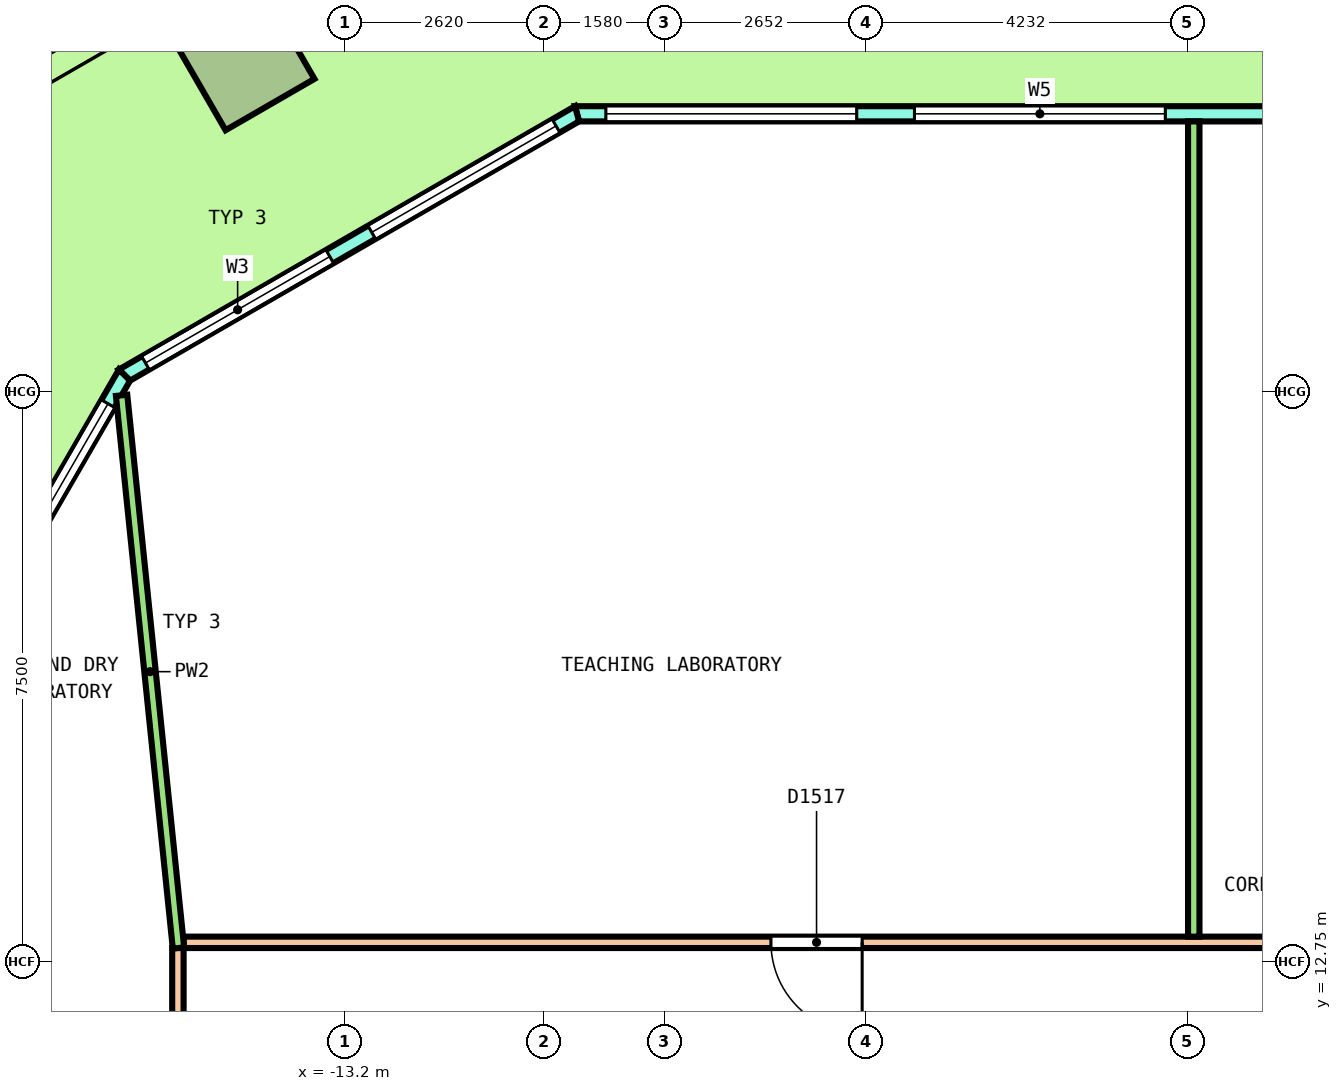
"""IFC4 building model, lengths in metres.
Left out: names, types, materials, properties, quantities, classifications, styles, units other than length and angle.
Written with IfcOpenShell. Run it as: python <this file> out.ifc"""

import sys

from ifc_helpers import new_model, si_unit, direction, frame, frame_2d, origin, origin_2d, place, context, subcontext, project, spatial, polyline, rectangle, outline, extrude, element, fill, save


model = new_model("IFC4")
c1 = context("Model", 3, precision=1e-05, world=origin(), true_north=direction((0.0, 1.0)))
c2 = subcontext(c1, "Body", "Model", "MODEL_VIEW")
j1 = project(units=[si_unit("LENGTHUNIT", "METRE"), si_unit("PLANEANGLEUNIT", "RADIAN")], contexts=[c1])
p1 = place(None, origin())
s1 = spatial("IfcSite", under=j1, at=p1, CompositionType="ELEMENT")
p2 = place(p1, origin())
s2 = spatial("IfcBuilding", under=s1, at=p2, CompositionType="ELEMENT")
p3 = place(p2, frame((0.0, 0.0, 89.6)))
s3 = spatial("IfcBuildingStorey", under=s2, at=p3, CompositionType="ELEMENT", Elevation=89.6)
p4 = place(p3, frame((-14.526, 24.606, 0.0), z_axis=(-0.036267419622, 0.0, 0.999342120734), x_axis=(-0.865313477853, -0.500246354177, -0.031403346616)))
e1 = element("IfcColumn", 1, at=p4, inside=s3, PredefinedType="COLUMN", context=c2, shape_type="SweptSolid", body=[
    extrude(rectangle(XDim=1.35, YDim=1.35, at=origin_2d()), origin(), (0.0, 0.0, 1.0), 4.052),
])
p5 = place(p3, frame((10.149, 23.9, 0.0), z_axis=(0.0, 0.0, 1.0), x_axis=(-1.0, 0.0, 0.0)))
e2 = element("IfcWall", 2, at=p5, inside=s3, PredefinedType="SOLIDWALL", context=c2, shape_type="SweptSolid", body=[
    extrude(outline(polyline([(-0.027, -0.1), (0.991, -0.1), (2.008, -0.1), (3.026, -0.1), (4.043, -0.1), (5.061, -0.1), (6.079, -0.1), (7.096, -0.1), (8.114, -0.1), (9.131, -0.1), (10.149, -0.1), (11.167, -0.1), (12.184, -0.1), (13.202, -0.1), (14.219, -0.1), (15.237, -0.1), (16.254, -0.1), (17.272, -0.1), (18.29, -0.1), (19.307, -0.1), (20.325, -0.1), (20.271, 0.1), (19.259, 0.1), (18.247, 0.1), (17.234, 0.1), (16.222, 0.1), (15.21, 0.1), (14.198, 0.1), (13.186, 0.1), (12.173, 0.1), (11.161, 0.1), (10.149, 0.1), (9.137, 0.1), (8.125, 0.1), (7.112, 0.1), (6.1, 0.1), (5.088, 0.1), (4.076, 0.1), (3.063, 0.1), (2.051, 0.1), (1.039, 0.1), (0.027, 0.1), (-0.027, -0.1)])), origin(), (0.0, 0.0, 1.0), 4.1),
])
p6 = place(p5, frame((0.38, 0.0, 0.1)))
e3 = element("IfcOpeningElement", 3, at=p6, cuts=e2, PredefinedType="OPENING", context=c2, shape_type="SweptSolid", body=[
    extrude(rectangle(XDim=3.3, YDim=2.9, at=frame_2d((1.65, 1.45))), frame((0.0, 0.11, 0.0), z_axis=(0.0, -1.0, 0.0), x_axis=(1.0, 0.0, 0.0)), (0.0, 0.0, 1.0), 0.22),
])
p7 = place(p5, frame((4.439, 0.0, 0.1)))
e4 = element("IfcOpeningElement", 4, at=p7, cuts=e2, PredefinedType="OPENING", context=c2, shape_type="SweptSolid", body=[
    extrude(rectangle(XDim=3.3, YDim=2.9, at=frame_2d((1.65, 1.45))), frame((0.0, 0.11, 0.0), z_axis=(0.0, -1.0, 0.0), x_axis=(1.0, 0.0, 0.0)), (0.0, 0.0, 1.0), 0.22),
])
p8 = place(p5, frame((9.249, 0.0, 0.0)))
e5 = element("IfcOpeningElement", 5, at=p8, cuts=e2, PredefinedType="OPENING", context=c2, shape_type="SweptSolid", body=[
    extrude(rectangle(XDim=1.8, YDim=2.4, at=frame_2d((0.9, 1.2))), frame((0.0, 0.11, 0.0), z_axis=(0.0, -1.0, 0.0), x_axis=(1.0, 0.0, 0.0)), (0.0, 0.0, 1.0), 0.22),
])
p9 = place(p5, frame((9.249, 0.0, 2.55)))
e6 = element("IfcOpeningElement", 6, at=p9, cuts=e2, PredefinedType="OPENING", context=c2, shape_type="SweptSolid", body=[
    extrude(rectangle(XDim=1.8, YDim=0.45, at=frame_2d((0.9, 0.225))), frame((0.0, 0.11, 0.0), z_axis=(0.0, -1.0, 0.0), x_axis=(1.0, 0.0, 0.0)), (0.0, 0.0, 1.0), 0.22),
])
p10 = place(p5, frame((12.559, 0.0, 0.1)))
e7 = element("IfcOpeningElement", 7, at=p10, cuts=e2, PredefinedType="OPENING", context=c2, shape_type="SweptSolid", body=[
    extrude(rectangle(XDim=3.3, YDim=2.9, at=frame_2d((1.65, 1.45))), frame((0.0, 0.11, 0.0), z_axis=(0.0, -1.0, 0.0), x_axis=(1.0, 0.0, 0.0)), (0.0, 0.0, 1.0), 0.22),
])
p11 = place(p5, frame((16.618, 0.0, 0.1)))
e8 = element("IfcOpeningElement", 8, at=p11, cuts=e2, PredefinedType="OPENING", context=c2, shape_type="SweptSolid", body=[
    extrude(rectangle(XDim=3.3, YDim=2.9, at=frame_2d((1.65, 1.45))), frame((0.0, 0.11, 0.0), z_axis=(0.0, -1.0, 0.0), x_axis=(1.0, 0.0, 0.0)), (0.0, 0.0, 1.0), 0.22),
])
p12 = place(p3, frame((-10.149, 23.9, 0.0), z_axis=(0.0, 0.0, 1.0), x_axis=(-0.866029458321, -0.49999297727, 0.0)))
e9 = element("IfcWall", 9, at=p12, inside=s3, PredefinedType="SOLIDWALL", context=c2, shape_type="SweptSolid", body=[
    extrude(outline(polyline([(-0.027, -0.1), (1.128, -0.1), (2.282, -0.1), (3.437, -0.1), (4.592, -0.1), (5.747, -0.1), (6.901, -0.1), (6.848, 0.1), (5.711, 0.1), (4.574, 0.1), (3.437, 0.1), (2.301, 0.1), (1.164, 0.1), (0.027, 0.1), (-0.027, -0.1)])), origin(), (0.0, 0.0, 1.0), 4.1),
])
p13 = place(p12, frame((0.319, 0.0, 0.1)))
e10 = element("IfcOpeningElement", 10, at=p13, cuts=e9, PredefinedType="OPENING", context=c2, shape_type="SweptSolid", body=[
    extrude(rectangle(XDim=2.8, YDim=2.9, at=frame_2d((1.4, 1.45))), frame((0.0, 0.11, 0.0), z_axis=(0.0, -1.0, 0.0), x_axis=(1.0, 0.0, 0.0)), (0.0, 0.0, 1.0), 0.22),
])
p14 = place(p12, frame((3.756, 0.0, 0.1)))
e11 = element("IfcOpeningElement", 11, at=p14, cuts=e9, PredefinedType="OPENING", context=c2, shape_type="SweptSolid", body=[
    extrude(rectangle(XDim=2.8, YDim=2.9, at=frame_2d((1.4, 1.45))), frame((0.0, 0.11, 0.0), z_axis=(0.0, -1.0, 0.0), x_axis=(1.0, 0.0, 0.0)), (0.0, 0.0, 1.0), 0.22),
])
p15 = place(p3, frame((-16.103, 20.463, 0.0), z_axis=(0.0, 0.0, 1.0), x_axis=(-0.500000373815, -0.866025187962, 0.0)))
e12 = element("IfcWall", 12, at=p15, inside=s3, PredefinedType="SOLIDWALL", context=c2, shape_type="SweptSolid", body=[
    extrude(outline(polyline([(-0.027, -0.1), (0.994, -0.1), (2.015, -0.1), (3.035, -0.1), (4.056, -0.1), (5.077, -0.1), (6.097, -0.1), (7.118, -0.1), (8.139, -0.1), (9.16, -0.1), (10.18, -0.1), (11.201, -0.1), (12.222, -0.1), (13.242, -0.1), (14.263, -0.1), (15.284, -0.1), (16.304, -0.1), (17.325, -0.1), (18.346, -0.1), (19.367, -0.1), (19.313, 0.1), (18.298, 0.1), (17.283, 0.1), (16.268, 0.1), (15.253, 0.1), (14.238, 0.1), (13.223, 0.1), (12.208, 0.1), (11.193, 0.1), (10.177, 0.1), (9.162, 0.1), (8.147, 0.1), (7.132, 0.1), (6.117, 0.1), (5.102, 0.1), (4.087, 0.1), (3.072, 0.1), (2.057, 0.1), (1.042, 0.1), (0.027, 0.1), (-0.027, -0.1)])), origin(), (0.0, 0.0, 1.0), 4.1),
])
p16 = place(p15, frame((0.434, 0.0, 0.1)))
e13 = element("IfcOpeningElement", 13, at=p16, cuts=e12, PredefinedType="OPENING", context=c2, shape_type="SweptSolid", body=[
    extrude(rectangle(XDim=3.0, YDim=2.9, at=frame_2d((1.5, 1.45))), frame((0.0, 0.11, 0.0), z_axis=(0.0, -1.0, 0.0), x_axis=(1.0, 0.0, 0.0)), (0.0, 0.0, 1.0), 0.22),
])
p17 = place(p15, frame((4.302, 0.0, 0.1)))
e14 = element("IfcOpeningElement", 14, at=p17, cuts=e12, PredefinedType="OPENING", context=c2, shape_type="SweptSolid", body=[
    extrude(rectangle(XDim=3.0, YDim=2.9, at=frame_2d((1.5, 1.45))), frame((0.0, 0.11, 0.0), z_axis=(0.0, -1.0, 0.0), x_axis=(1.0, 0.0, 0.0)), (0.0, 0.0, 1.0), 0.22),
])
p18 = place(p15, frame((8.77, 0.0, 0.0)))
e15 = element("IfcOpeningElement", 15, at=p18, cuts=e12, PredefinedType="OPENING", context=c2, shape_type="SweptSolid", body=[
    extrude(rectangle(XDim=1.8, YDim=2.4, at=frame_2d((0.9, 1.2))), frame((0.0, 0.11, 0.0), z_axis=(0.0, -1.0, 0.0), x_axis=(1.0, 0.0, 0.0)), (0.0, 0.0, 1.0), 0.22),
])
p19 = place(p15, frame((8.77, 0.0, 2.55)))
e16 = element("IfcOpeningElement", 16, at=p19, cuts=e12, PredefinedType="OPENING", context=c2, shape_type="SweptSolid", body=[
    extrude(rectangle(XDim=1.8, YDim=0.45, at=frame_2d((0.9, 0.225))), frame((0.0, 0.11, 0.0), z_axis=(0.0, -1.0, 0.0), x_axis=(1.0, 0.0, 0.0)), (0.0, 0.0, 1.0), 0.22),
])
p20 = place(p15, frame((12.038, 0.0, 0.1)))
e17 = element("IfcOpeningElement", 17, at=p20, cuts=e12, PredefinedType="OPENING", context=c2, shape_type="SweptSolid", body=[
    extrude(rectangle(XDim=3.0, YDim=2.9, at=frame_2d((1.5, 1.45))), frame((0.0, 0.11, 0.0), z_axis=(0.0, -1.0, 0.0), x_axis=(1.0, 0.0, 0.0)), (0.0, 0.0, 1.0), 0.22),
])
p21 = place(p15, frame((15.906, 0.0, 0.1)))
e18 = element("IfcOpeningElement", 18, at=p21, cuts=e12, PredefinedType="OPENING", context=c2, shape_type="SweptSolid", body=[
    extrude(rectangle(XDim=3.0, YDim=2.9, at=frame_2d((1.5, 1.45))), frame((0.0, 0.11, 0.0), z_axis=(0.0, -1.0, 0.0), x_axis=(1.0, 0.0, 0.0)), (0.0, 0.0, 1.0), 0.22),
])
p22 = place(p3, frame((-15.325, 13.0, 0.0), z_axis=(0.0, 0.0, 1.0), x_axis=(1.0, 0.0, 0.0)))
e19 = element("IfcWall", 19, at=p22, inside=s3, PredefinedType="PARTITIONING", context=c2, shape_type="SweptSolid", body=[
    extrude(rectangle(XDim=30.675, YDim=0.15, at=frame_2d((15.337, 0.0))), origin(), (0.0, 0.0, 1.0), 3.05),
])
p23 = place(p22, frame((29.113, 0.0, 0.0)))
e20 = element("IfcOpeningElement", 20, at=p23, cuts=e19, PredefinedType="OPENING", context=c2, shape_type="SweptSolid", body=[
    extrude(rectangle(XDim=1.0, YDim=2.1, at=frame_2d((0.5, 1.05))), frame((0.0, 0.085, 0.0), z_axis=(0.0, -1.0, 0.0), x_axis=(1.0, 0.0, 0.0)), (0.0, 0.0, 1.0), 0.17),
])
p24 = place(p22, frame((23.773, 0.0, 0.0)))
e21 = element("IfcOpeningElement", 21, at=p24, cuts=e19, PredefinedType="OPENING", context=c2, shape_type="SweptSolid", body=[
    extrude(rectangle(XDim=1.0, YDim=2.1, at=frame_2d((0.5, 1.05))), frame((0.0, 0.085, 0.0), z_axis=(0.0, -1.0, 0.0), x_axis=(1.0, 0.0, 0.0)), (0.0, 0.0, 1.0), 0.17),
])
p25 = place(p22, frame((7.727, 0.0, 0.0)))
e22 = element("IfcOpeningElement", 22, at=p25, cuts=e19, PredefinedType="OPENING", context=c2, shape_type="SweptSolid", body=[
    extrude(rectangle(XDim=1.2, YDim=2.1, at=frame_2d((0.6, 1.05))), frame((0.0, 0.085, 0.0), z_axis=(0.0, -1.0, 0.0), x_axis=(1.0, 0.0, 0.0)), (0.0, 0.0, 1.0), 0.17),
])
p26 = place(p3, frame((-15.4, -12.925, 0.0), z_axis=(0.0, 0.0, 1.0), x_axis=(0.0, 1.0, 0.0)))
e23 = element("IfcWall", 23, at=p26, inside=s3, PredefinedType="PARTITIONING", context=c2, shape_type="SweptSolid", body=[
    extrude(rectangle(XDim=25.85, YDim=0.15, at=frame_2d((12.925, 0.0))), origin(), (0.0, 0.0, 1.0), 3.05),
])
p27 = place(p26, frame((21.375, 0.0, 0.0)))
e24 = element("IfcOpeningElement", 24, at=p27, cuts=e23, PredefinedType="OPENING", context=c2, shape_type="SweptSolid", body=[
    extrude(rectangle(XDim=1.2, YDim=2.1, at=frame_2d((0.6, 1.05))), frame((0.0, 0.085, 0.0), z_axis=(0.0, -1.0, 0.0), x_axis=(1.0, 0.0, 0.0)), (0.0, 0.0, 1.0), 0.17),
])
p28 = place(p26, frame((15.497, 0.0, 0.0)))
e25 = element("IfcOpeningElement", 25, at=p28, cuts=e23, PredefinedType="OPENING", context=c2, shape_type="SweptSolid", body=[
    extrude(rectangle(XDim=1.2, YDim=2.1, at=frame_2d((0.6, 1.05))), frame((0.0, 0.085, 0.0), z_axis=(0.0, -1.0, 0.0), x_axis=(1.0, 0.0, 0.0)), (0.0, 0.0, 1.0), 0.17),
])
p29 = place(p26, frame((3.566, 0.0, 0.0)))
e26 = element("IfcOpeningElement", 26, at=p29, cuts=e23, PredefinedType="OPENING", context=c2, shape_type="SweptSolid", body=[
    extrude(rectangle(XDim=1.2, YDim=2.1, at=frame_2d((0.6, 1.05))), frame((0.0, 0.085, 0.0), z_axis=(0.0, -1.0, 0.0), x_axis=(1.0, 0.0, 0.0)), (0.0, 0.0, 1.0), 0.17),
])
p30 = place(p3, frame((-2.035, 13.075, 0.0), z_axis=(0.0, 0.0, 1.0), x_axis=(0.0, 1.0, 0.0)))
e27 = element("IfcWall", 27, at=p30, inside=s3, PredefinedType="PARTITIONING", context=c2, shape_type="SweptSolid", body=[
    extrude(rectangle(XDim=10.725, YDim=0.15, at=frame_2d((5.363, 0.0))), origin(), (0.0, 0.0, 1.0), 3.05),
])
p31 = place(p3, frame((-16.141, 20.196, 0.0), z_axis=(0.0, 0.0, 1.0), x_axis=(0.10240685, -0.994742598401, 0.0)))
e28 = element("IfcWall", 28, at=p31, inside=s3, PredefinedType="PARTITIONING", context=c2, shape_type="SweptSolid", body=[
    extrude(rectangle(XDim=7.309, YDim=0.15, at=frame_2d((3.655, 0.0))), origin(), (0.0, 0.0, 1.0), 3.05),
])
p32 = place(p10, origin())
e29 = element("IfcWindow", 29, at=p32, inside=s3, PartitioningType="SINGLE_PANEL", PredefinedType="WINDOW", context=c2, shape_type="SweptSolid", body=[
    extrude(rectangle(XDim=3.3, YDim=2.9, at=frame_2d((1.65, 1.45))), frame((0.0, 0.03, 0.0), z_axis=(0.0, -1.0, 0.0), x_axis=(1.0, 0.0, 0.0)), (0.0, 0.0, 1.0), 0.06),
])
fill(e7, e29)
p33 = place(p11, origin())
e30 = element("IfcWindow", 30, at=p33, inside=s3, PartitioningType="SINGLE_PANEL", PredefinedType="WINDOW", context=c2, shape_type="SweptSolid", body=[
    extrude(rectangle(XDim=3.3, YDim=2.9, at=frame_2d((1.65, 1.45))), frame((0.0, 0.03, 0.0), z_axis=(0.0, -1.0, 0.0), x_axis=(1.0, 0.0, 0.0)), (0.0, 0.0, 1.0), 0.06),
])
fill(e8, e30)
p34 = place(p13, origin())
e31 = element("IfcWindow", 31, at=p34, inside=s3, PartitioningType="SINGLE_PANEL", PredefinedType="WINDOW", context=c2, shape_type="SweptSolid", body=[
    extrude(rectangle(XDim=2.8, YDim=2.9, at=frame_2d((1.4, 1.45))), frame((0.0, 0.03, 0.0), z_axis=(0.0, -1.0, 0.0), x_axis=(1.0, 0.0, 0.0)), (0.0, 0.0, 1.0), 0.06),
])
fill(e10, e31)
p35 = place(p14, origin())
e32 = element("IfcWindow", 32, at=p35, inside=s3, PartitioningType="SINGLE_PANEL", PredefinedType="WINDOW", context=c2, shape_type="SweptSolid", body=[
    extrude(rectangle(XDim=2.8, YDim=2.9, at=frame_2d((1.4, 1.45))), frame((0.0, 0.03, 0.0), z_axis=(0.0, -1.0, 0.0), x_axis=(1.0, 0.0, 0.0)), (0.0, 0.0, 1.0), 0.06),
])
fill(e11, e32)
p36 = place(p16, origin())
e33 = element("IfcWindow", 33, at=p36, inside=s3, PartitioningType="SINGLE_PANEL", PredefinedType="WINDOW", context=c2, shape_type="SweptSolid", body=[
    extrude(rectangle(XDim=3.0, YDim=2.9, at=frame_2d((1.5, 1.45))), frame((0.0, 0.03, 0.0), z_axis=(0.0, -1.0, 0.0), x_axis=(1.0, 0.0, 0.0)), (0.0, 0.0, 1.0), 0.06),
])
fill(e13, e33)
p37 = place(p25, origin())
e34 = element("IfcDoor", 34, at=p37, inside=s3, OperationType="DOUBLE_DOOR_SINGLE_SWING", PredefinedType="DOOR", context=c2, shape_type="SweptSolid", body=[
    extrude(rectangle(XDim=1.2, YDim=2.1, at=frame_2d((0.6, 1.05))), frame((0.0, 0.025, 0.0), z_axis=(0.0, -1.0, 0.0), x_axis=(1.0, 0.0, 0.0)), (0.0, 0.0, 1.0), 0.05),
])
fill(e22, e34)
save(model, sys.argv[1])
